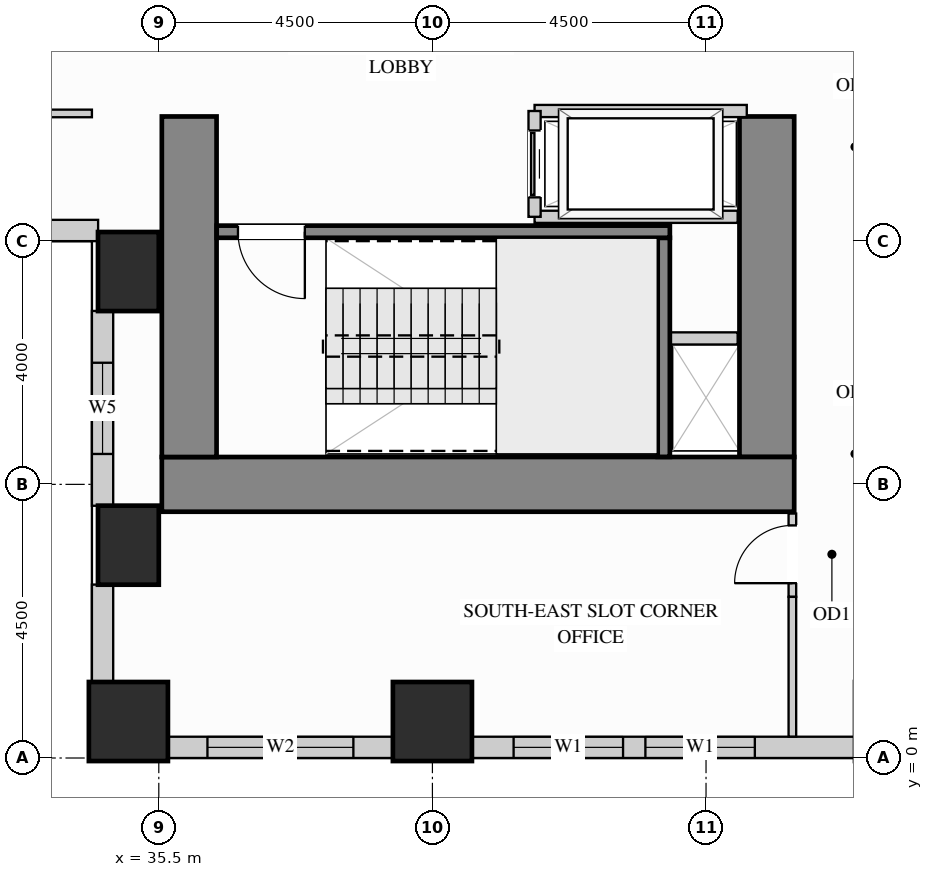
"""IFC4 building model, lengths in metres.
Left out: names, types, materials, properties, quantities, classifications, styles, units other than length and angle.
Written with IfcOpenShell. Run it as: python <this file> out.ifc"""

import sys

from ifc_helpers import new_model, si_unit, direction, frame, frame_2d, origin, origin_2d, place, context, subcontext, project, spatial, rectangle, extrude, source, transform, mapped, element, fill, save


model = new_model("IFC4")
c1 = context("Model", 3, precision=1e-05, world=origin(), true_north=direction((0.0, 1.0)))
c2 = subcontext(c1, "Body", "Model", "MODEL_VIEW")
j1 = project(units=[si_unit("LENGTHUNIT", "METRE"), si_unit("PLANEANGLEUNIT", "RADIAN")], contexts=[c1])
p1 = place(None, origin())
s1 = spatial("IfcSite", under=j1, at=p1, CompositionType="ELEMENT")
p2 = place(p1, origin())
s2 = spatial("IfcBuilding", under=s1, at=p2, CompositionType="ELEMENT")
p3 = place(p2, frame((0.0, 0.0, 54.9)))
s3 = spatial("IfcBuildingStorey", under=s2, at=p3, CompositionType="ELEMENT", Elevation=54.9)
m1 = source(origin(), c2, "Body", "SweptSolid", [
    extrude(rectangle(XDim=1.0, YDim=1.3, at=origin_2d()), origin(), (0.0, 0.0, 1.0), 3.38),
])
for number, where, z_axis, x_axis in (
    (1, (35.0, 3.5, 0.0), (0.0, 0.0, 1.0), (1.0, 0.0, 0.0)),
    (2, (35.0, 8.0, 0.0), (0.0, 0.0, 1.0), (1.0, 0.0, 0.0)),
):
    element("IfcColumn", number, at=place(p3, frame(where, z_axis=z_axis, x_axis=x_axis)), inside=s3, PredefinedType="COLUMN", context=c2, shape_type="MappedRepresentation", body=[
        mapped(m1, transform((0.0, 0.0, 0.0), x_axis=(1.0, 0.0, 0.0), y_axis=(0.0, 1.0, 0.0), z_axis=(0.0, 0.0, 1.0))),
    ])
m2 = source(origin(), c2, "Body", "SweptSolid", [
    extrude(rectangle(XDim=1.3, YDim=1.3, at=origin_2d()), origin(), (0.0, 0.0, 1.0), 3.38),
])
for number, where, z_axis, x_axis in (
    (3, (35.0, 0.6, 0.0), (0.0, 0.0, 1.0), (1.0, 0.0, 0.0)),
    (4, (40.0, 0.6, 0.0), (0.0, 0.0, 1.0), (1.0, 0.0, 0.0)),
):
    element("IfcColumn", number, at=place(p3, frame(where, z_axis=z_axis, x_axis=x_axis)), inside=s3, PredefinedType="COLUMN", context=c2, shape_type="MappedRepresentation", body=[
        mapped(m2, transform((0.0, 0.0, 0.0), x_axis=(1.0, 0.0, 0.0), y_axis=(0.0, 1.0, 0.0), z_axis=(0.0, 0.0, 1.0))),
    ])
m3 = source(origin(), c2, "Body", "SweptSolid", [
    extrude(rectangle(XDim=5.6, YDim=0.9, at=frame_2d((2.8, 0.0))), origin(), (0.0, 0.0, 1.0), 3.38),
])
p4 = place(p3, frame((45.5, 4.95, 0.0), z_axis=(0.0, 0.0, 1.0), x_axis=(0.0, 1.0, 0.0)))
e5 = element("IfcWall", 5, at=p4, inside=s3, PredefinedType="SHEAR", context=c2, shape_type="MappedRepresentation", body=[
    mapped(m3, transform((0.0, 0.0, 0.0), x_axis=(1.0, 0.0, 0.0), y_axis=(0.0, 1.0, 0.0), z_axis=(0.0, 0.0, 1.0))),
])
m4 = source(origin(), c2, "Body", "SweptSolid", [
    extrude(rectangle(XDim=10.4, YDim=0.9, at=frame_2d((5.2, 0.0))), origin(), (0.0, 0.0, 1.0), 3.38),
])
p5 = place(p3, frame((35.55, 4.5, 0.0), z_axis=(0.0, 0.0, 1.0), x_axis=(1.0, 0.0, 0.0)))
e6 = element("IfcWall", 6, at=p5, inside=s3, PredefinedType="SHEAR", context=c2, shape_type="MappedRepresentation", body=[
    mapped(m4, transform((0.0, 0.0, 0.0), x_axis=(1.0, 0.0, 0.0), y_axis=(0.0, 1.0, 0.0), z_axis=(0.0, 0.0, 1.0))),
])
p6 = place(p3, frame((36.0, 4.95, 0.0), z_axis=(0.0, 0.0, 1.0), x_axis=(0.0, 1.0, 0.0)))
e7 = element("IfcWall", 7, at=p6, inside=s3, PredefinedType="SHEAR", context=c2, shape_type="MappedRepresentation", body=[
    mapped(m3, transform((0.0, 0.0, 0.0), x_axis=(1.0, 0.0, 0.0), y_axis=(0.0, 1.0, 0.0), z_axis=(0.0, 0.0, 1.0))),
])
p7 = place(p3, frame((30.998, 8.675, 0.0), z_axis=(0.0, 0.0, 1.0), x_axis=(1.0, 0.0, 0.0)))
e8 = element("IfcWall", 8, at=p7, inside=s3, PredefinedType="SOLIDWALL", context=c2, shape_type="SweptSolid", body=[
    extrude(rectangle(XDim=3.504, YDim=0.35, at=frame_2d((1.752, 0.0))), origin(), (0.0, 0.0, 1.0), 3.365),
])
p8 = place(p7, frame((1.002, 0.0, 0.78)))
e9 = element("IfcOpeningElement", 9, at=p8, cuts=e8, PredefinedType="OPENING", context=c2, shape_type="SweptSolid", body=[
    extrude(rectangle(XDim=1.5, YDim=2.0, at=frame_2d((0.75, 1.0))), frame((0.0, 0.185, 0.0), z_axis=(0.0, -1.0, 0.0), x_axis=(1.0, 0.0, 0.0)), (0.0, 0.0, 1.0), 0.37),
])
p9 = place(p3, frame((34.575, 7.352, 0.0), z_axis=(0.0, 0.0, 1.0), x_axis=(0.0, -1.0, 0.0)))
e10 = element("IfcWall", 10, at=p9, inside=s3, PredefinedType="SOLIDWALL", context=c2, shape_type="SweptSolid", body=[
    extrude(rectangle(XDim=3.204, YDim=0.35, at=frame_2d((1.602, 0.0))), origin(), (0.0, 0.0, 1.0), 2.51),
])
p10 = place(p9, frame((0.852, 0.0, 0.78)))
e11 = element("IfcOpeningElement", 11, at=p10, cuts=e10, PredefinedType="OPENING", context=c2, shape_type="SweptSolid", body=[
    extrude(rectangle(XDim=1.5, YDim=1.55, at=frame_2d((0.75, 0.775))), frame((0.0, 0.185, 0.0), z_axis=(0.0, -1.0, 0.0), x_axis=(1.0, 0.0, 0.0)), (0.0, 0.0, 1.0), 0.37),
])
m5 = source(origin(), c2, "Body", "SweptSolid", [
    extrude(rectangle(XDim=1.604, YDim=0.35, at=frame_2d((0.802, 0.0))), origin(), (0.0, 0.0, 1.0), 2.51),
])
p11 = place(p3, frame((34.575, 2.852, 0.0), z_axis=(0.0, 0.0, 1.0), x_axis=(0.0, -1.0, 0.0)))
e12 = element("IfcWall", 12, at=p11, inside=s3, PredefinedType="SOLIDWALL", context=c2, shape_type="MappedRepresentation", body=[
    mapped(m5, transform((0.0, 0.0, 0.0), x_axis=(1.0, 0.0, 0.0), y_axis=(0.0, 1.0, 0.0), z_axis=(0.0, 0.0, 1.0))),
])
p12 = place(p3, frame((35.648, 0.175, 0.0), z_axis=(0.0, 0.0, 1.0), x_axis=(1.0, 0.0, 0.0)))
e13 = element("IfcWall", 13, at=p12, inside=s3, PredefinedType="SOLIDWALL", context=c2, shape_type="SweptSolid", body=[
    extrude(rectangle(XDim=3.704, YDim=0.35, at=frame_2d((1.852, 0.0))), origin(), (0.0, 0.0, 1.0), 2.51),
])
p13 = place(p12, frame((0.652, 0.0, 0.78)))
e14 = element("IfcOpeningElement", 14, at=p13, cuts=e13, PredefinedType="OPENING", context=c2, shape_type="SweptSolid", body=[
    extrude(rectangle(XDim=2.4, YDim=1.55, at=frame_2d((1.2, 0.775))), frame((0.0, 0.185, 0.0), z_axis=(0.0, -1.0, 0.0), x_axis=(1.0, 0.0, 0.0)), (0.0, 0.0, 1.0), 0.37),
])
p14 = place(p3, frame((40.648, 0.175, 0.0), z_axis=(0.0, 0.0, 1.0), x_axis=(1.0, 0.0, 0.0)))
e15 = element("IfcWall", 15, at=p14, inside=s3, PredefinedType="SOLIDWALL", context=c2, shape_type="SweptSolid", body=[
    extrude(rectangle(XDim=6.304, YDim=0.35, at=frame_2d((3.152, 0.0))), origin(), (0.0, 0.0, 1.0), 2.51),
])
p15 = place(p14, frame((0.687, 0.0, 0.78)))
e16 = element("IfcOpeningElement", 16, at=p15, cuts=e15, PredefinedType="OPENING", context=c2, shape_type="SweptSolid", body=[
    extrude(rectangle(XDim=1.8, YDim=1.55, at=frame_2d((0.9, 0.775))), frame((0.0, 0.185, 0.0), z_axis=(0.0, -1.0, 0.0), x_axis=(1.0, 0.0, 0.0)), (0.0, 0.0, 1.0), 0.37),
])
p16 = place(p14, frame((2.855, 0.0, 0.78)))
e17 = element("IfcOpeningElement", 17, at=p16, cuts=e15, PredefinedType="OPENING", context=c2, shape_type="SweptSolid", body=[
    extrude(rectangle(XDim=1.8, YDim=1.55, at=frame_2d((0.9, 0.775))), frame((0.0, 0.185, 0.0), z_axis=(0.0, -1.0, 0.0), x_axis=(1.0, 0.0, 0.0)), (0.0, 0.0, 1.0), 0.37),
])
p17 = place(p3, frame((45.92, 2.65, 0.0), z_axis=(0.0, 0.0, 1.0), x_axis=(0.0, 1.0, 0.0)))
e18 = element("IfcWall", 18, at=p17, inside=s3, PredefinedType="PARTITIONING", context=c2, shape_type="SweptSolid", body=[
    extrude(rectangle(XDim=1.37, YDim=0.125, at=frame_2d((0.685, 0.0))), origin(), (0.0, 0.0, 1.0), 3.365),
])
p18 = place(p17, frame((0.225, 0.0, 0.0)))
e19 = element("IfcOpeningElement", 19, at=p18, cuts=e18, PredefinedType="OPENING", context=c2, shape_type="SweptSolid", body=[
    extrude(rectangle(XDim=0.95, YDim=2.15, at=frame_2d((0.475, 1.075))), frame((0.0, 0.073, 0.0), z_axis=(0.0, -1.0, 0.0), x_axis=(1.0, 0.0, 0.0)), (0.0, 0.0, 1.0), 0.145),
])
m6 = source(origin(), c2, "Body", "SweptSolid", [
    extrude(rectangle(XDim=2.298, YDim=0.125, at=frame_2d((1.149, 0.0))), origin(), (0.0, 0.0, 1.0), 3.365),
])
p19 = place(p3, frame((45.92, 0.352, 0.0), z_axis=(0.0, 0.0, 1.0), x_axis=(0.0, 1.0, 0.0)))
e20 = element("IfcWall", 20, at=p19, inside=s3, PredefinedType="PARTITIONING", context=c2, shape_type="MappedRepresentation", body=[
    mapped(m6, transform((0.0, 0.0, 0.0), x_axis=(1.0, 0.0, 0.0), y_axis=(0.0, 1.0, 0.0), z_axis=(0.0, 0.0, 1.0))),
])
p20 = place(p3, frame((19.5, 10.6, 0.0), z_axis=(0.0, 0.0, 1.0), x_axis=(1.0, 0.0, 0.0)))
e21 = element("IfcWall", 21, at=p20, inside=s3, PredefinedType="PARTITIONING", context=c2, shape_type="SweptSolid", body=[
    extrude(rectangle(XDim=14.9, YDim=0.125, at=frame_2d((7.45, 0.0))), origin(), (0.0, 0.0, 1.0), 3.365),
])
p21 = place(p20, frame((6.975, 0.0, 0.0)))
e22 = element("IfcOpeningElement", 22, at=p21, cuts=e21, PredefinedType="OPENING", context=c2, shape_type="SweptSolid", body=[
    extrude(rectangle(XDim=0.95, YDim=2.15, at=frame_2d((0.475, 1.075))), frame((0.0, 0.073, 0.0), z_axis=(0.0, -1.0, 0.0), x_axis=(1.0, 0.0, 0.0)), (0.0, 0.0, 1.0), 0.145),
])
m7 = source(origin(), c2, "Body", "SweptSolid", [
    extrude(rectangle(XDim=1.17, YDim=0.2, at=frame_2d((0.585, 0.0))), origin(), (0.0, 0.0, 1.0), 3.365),
])
p22 = place(p3, frame((43.85, 6.9, 0.0), z_axis=(0.0, 0.0, 1.0), x_axis=(1.0, 0.0, 0.0)))
e23 = element("IfcWall", 23, at=p22, inside=s3, PredefinedType="PARTITIONING", context=c2, shape_type="MappedRepresentation", body=[
    mapped(m7, transform((0.0, 0.0, 0.0), x_axis=(1.0, 0.0, 0.0), y_axis=(0.0, 1.0, 0.0), z_axis=(0.0, 0.0, 1.0))),
])
m8 = source(origin(), c2, "Body", "SweptSolid", [
    extrude(rectangle(XDim=3.49, YDim=0.2, at=frame_2d((1.745, 0.0))), origin(), (0.0, 0.0, 1.0), 3.365),
])
p23 = place(p3, frame((41.68, 10.64, 0.0), z_axis=(0.0, 0.0, 1.0), x_axis=(1.0, 0.0, 0.0)))
e24 = element("IfcWall", 24, at=p23, inside=s3, PredefinedType="PARTITIONING", context=c2, shape_type="MappedRepresentation", body=[
    mapped(m8, transform((0.0, 0.0, 0.0), x_axis=(1.0, 0.0, 0.0), y_axis=(0.0, 1.0, 0.0), z_axis=(0.0, 0.0, 1.0))),
])
m9 = source(origin(), c2, "Body", "SweptSolid", [
    extrude(rectangle(XDim=3.34, YDim=0.2, at=frame_2d((1.67, 0.0))), origin(), (0.0, 0.0, 1.0), 3.365),
])
p24 = place(p3, frame((41.68, 8.9, 0.0), z_axis=(0.0, 0.0, 1.0), x_axis=(1.0, 0.0, 0.0)))
e25 = element("IfcWall", 25, at=p24, inside=s3, PredefinedType="PARTITIONING", context=c2, shape_type="MappedRepresentation", body=[
    mapped(m9, transform((0.0, 0.0, 0.0), x_axis=(1.0, 0.0, 0.0), y_axis=(0.0, 1.0, 0.0), z_axis=(0.0, 0.0, 1.0))),
])
p25 = place(p3, frame((41.68, 8.9, 0.0), z_axis=(0.0, 0.0, 1.0), x_axis=(0.0, 1.0, 0.0)))
e26 = element("IfcWall", 26, at=p25, inside=s3, PredefinedType="PARTITIONING", context=c2, shape_type="SweptSolid", body=[
    extrude(rectangle(XDim=1.74, YDim=0.2, at=frame_2d((0.87, 0.0))), origin(), (0.0, 0.0, 1.0), 3.365),
])
p26 = place(p25, frame((0.32, 0.0, 0.0)))
e27 = element("IfcOpeningElement", 27, at=p26, cuts=e26, PredefinedType="OPENING", context=c2, shape_type="SweptSolid", body=[
    extrude(rectangle(XDim=1.1, YDim=2.2, at=frame_2d((0.55, 1.1))), frame((0.0, 0.11, 0.0), z_axis=(0.0, -1.0, 0.0), x_axis=(1.0, 0.0, 0.0)), (0.0, 0.0, 1.0), 0.22),
])
m10 = source(origin(), c2, "Body", "SweptSolid", [
    extrude(rectangle(XDim=3.603, YDim=0.2, at=frame_2d((1.802, 0.0))), origin(), (0.0, 0.0, 1.0), 3.38),
])
p27 = place(p3, frame((43.805, 4.952, 0.0), z_axis=(0.0, 0.0, 1.0), x_axis=(0.0, 1.0, 0.0)))
e28 = element("IfcWall", 28, at=p27, inside=s3, PredefinedType="SHEAR", context=c2, shape_type="MappedRepresentation", body=[
    mapped(m10, transform((0.0, 0.0, 0.0), x_axis=(1.0, 0.0, 0.0), y_axis=(0.0, 1.0, 0.0), z_axis=(0.0, 0.0, 1.0))),
])
p28 = place(p3, frame((36.452, 8.655, 0.0), z_axis=(0.0, 0.0, 1.0), x_axis=(1.0, 0.0, 0.0)))
e29 = element("IfcWall", 29, at=p28, inside=s3, PredefinedType="SHEAR", context=c2, shape_type="SweptSolid", body=[
    extrude(rectangle(XDim=7.453, YDim=0.2, at=frame_2d((3.727, 0.0))), origin(), (0.0, 0.0, 1.0), 3.38),
])
p29 = place(p28, frame((0.35, 0.0, 0.0)))
e30 = element("IfcOpeningElement", 30, at=p29, cuts=e29, PredefinedType="OPENING", context=c2, shape_type="SweptSolid", body=[
    extrude(rectangle(XDim=1.1, YDim=2.15, at=frame_2d((0.55, 1.075))), frame((0.0, 0.11, 0.0), z_axis=(0.0, -1.0, 0.0), x_axis=(1.0, 0.0, 0.0)), (0.0, 0.0, 1.0), 0.22),
])
m11 = source(origin(), c2, "Body", "SweptSolid", [
    extrude(rectangle(XDim=1.1, YDim=2.2, at=frame_2d((0.55, 1.1))), frame((0.0, 0.025, 0.0), z_axis=(0.0, -1.0, 0.0), x_axis=(1.0, 0.0, 0.0)), (0.0, 0.0, 1.0), 0.05),
])
p30 = place(p26, origin())
e31 = element("IfcDoor", 31, at=p30, inside=s3, OperationType="SLIDING_TO_LEFT", PredefinedType="DOOR", context=c2, shape_type="MappedRepresentation", body=[
    mapped(m11, transform((0.0, 0.0, 0.0), x_axis=(1.0, 0.0, 0.0), y_axis=(0.0, 1.0, 0.0), z_axis=(0.0, 0.0, 1.0))),
])
fill(e27, e31)
m12 = source(origin(), c2, "Body", "SweptSolid", [
    extrude(rectangle(XDim=0.95, YDim=2.15, at=frame_2d((0.475, 1.075))), frame((0.0, 0.025, 0.0), z_axis=(0.0, -1.0, 0.0), x_axis=(1.0, 0.0, 0.0)), (0.0, 0.0, 1.0), 0.05),
])
p31 = place(p18, origin())
e32 = element("IfcDoor", 32, at=p31, inside=s3, OperationType="SINGLE_SWING_LEFT", PredefinedType="DOOR", context=c2, shape_type="MappedRepresentation", body=[
    mapped(m12, transform((0.0, 0.0, 0.0), x_axis=(1.0, 0.0, 0.0), y_axis=(0.0, 1.0, 0.0), z_axis=(0.0, 0.0, 1.0))),
])
fill(e19, e32)
m13 = source(origin(), c2, "Body", "SweptSolid", [
    extrude(rectangle(XDim=1.1, YDim=2.15, at=frame_2d((0.55, 1.075))), frame((0.0, 0.025, 0.0), z_axis=(0.0, -1.0, 0.0), x_axis=(1.0, 0.0, 0.0)), (0.0, 0.0, 1.0), 0.05),
])
p32 = place(p29, origin())
e33 = element("IfcDoor", 33, at=p32, inside=s3, OperationType="SINGLE_SWING_RIGHT", PredefinedType="DOOR", context=c2, shape_type="MappedRepresentation", body=[
    mapped(m13, transform((0.0, 0.0, 0.0), x_axis=(1.0, 0.0, 0.0), y_axis=(0.0, 1.0, 0.0), z_axis=(0.0, 0.0, 1.0))),
])
fill(e30, e33)
m14 = source(origin(), c2, "Body", "SweptSolid", [
    extrude(rectangle(XDim=1.8, YDim=1.55, at=frame_2d((0.9, 0.775))), frame((0.0, 0.03, 0.0), z_axis=(0.0, -1.0, 0.0), x_axis=(1.0, 0.0, 0.0)), (0.0, 0.0, 1.0), 0.06),
])
p33 = place(p15, origin())
e34 = element("IfcWindow", 34, at=p33, inside=s3, PartitioningType="SINGLE_PANEL", PredefinedType="WINDOW", context=c2, shape_type="MappedRepresentation", body=[
    mapped(m14, transform((0.0, 0.0, 0.0), x_axis=(1.0, 0.0, 0.0), y_axis=(0.0, 1.0, 0.0), z_axis=(0.0, 0.0, 1.0))),
])
fill(e16, e34)
p34 = place(p16, origin())
e35 = element("IfcWindow", 35, at=p34, inside=s3, PartitioningType="SINGLE_PANEL", PredefinedType="WINDOW", context=c2, shape_type="MappedRepresentation", body=[
    mapped(m14, transform((0.0, 0.0, 0.0), x_axis=(1.0, 0.0, 0.0), y_axis=(0.0, 1.0, 0.0), z_axis=(0.0, 0.0, 1.0))),
])
fill(e17, e35)
m15 = source(origin(), c2, "Body", "SweptSolid", [
    extrude(rectangle(XDim=2.4, YDim=1.55, at=frame_2d((1.2, 0.775))), frame((0.0, 0.03, 0.0), z_axis=(0.0, -1.0, 0.0), x_axis=(1.0, 0.0, 0.0)), (0.0, 0.0, 1.0), 0.06),
])
p35 = place(p13, origin())
e36 = element("IfcWindow", 36, at=p35, inside=s3, PartitioningType="SINGLE_PANEL", PredefinedType="WINDOW", context=c2, shape_type="MappedRepresentation", body=[
    mapped(m15, transform((0.0, 0.0, 0.0), x_axis=(1.0, 0.0, 0.0), y_axis=(0.0, 1.0, 0.0), z_axis=(0.0, 0.0, 1.0))),
])
fill(e14, e36)
m16 = source(origin(), c2, "Body", "SweptSolid", [
    extrude(rectangle(XDim=1.5, YDim=1.55, at=frame_2d((0.75, 0.775))), frame((0.0, 0.03, 0.0), z_axis=(0.0, -1.0, 0.0), x_axis=(1.0, 0.0, 0.0)), (0.0, 0.0, 1.0), 0.06),
])
p36 = place(p10, origin())
e37 = element("IfcWindow", 37, at=p36, inside=s3, PartitioningType="SINGLE_PANEL", PredefinedType="WINDOW", context=c2, shape_type="MappedRepresentation", body=[
    mapped(m16, transform((0.0, 0.0, 0.0), x_axis=(1.0, 0.0, 0.0), y_axis=(0.0, 1.0, 0.0), z_axis=(0.0, 0.0, 1.0))),
])
fill(e11, e37)
save(model, sys.argv[1])
